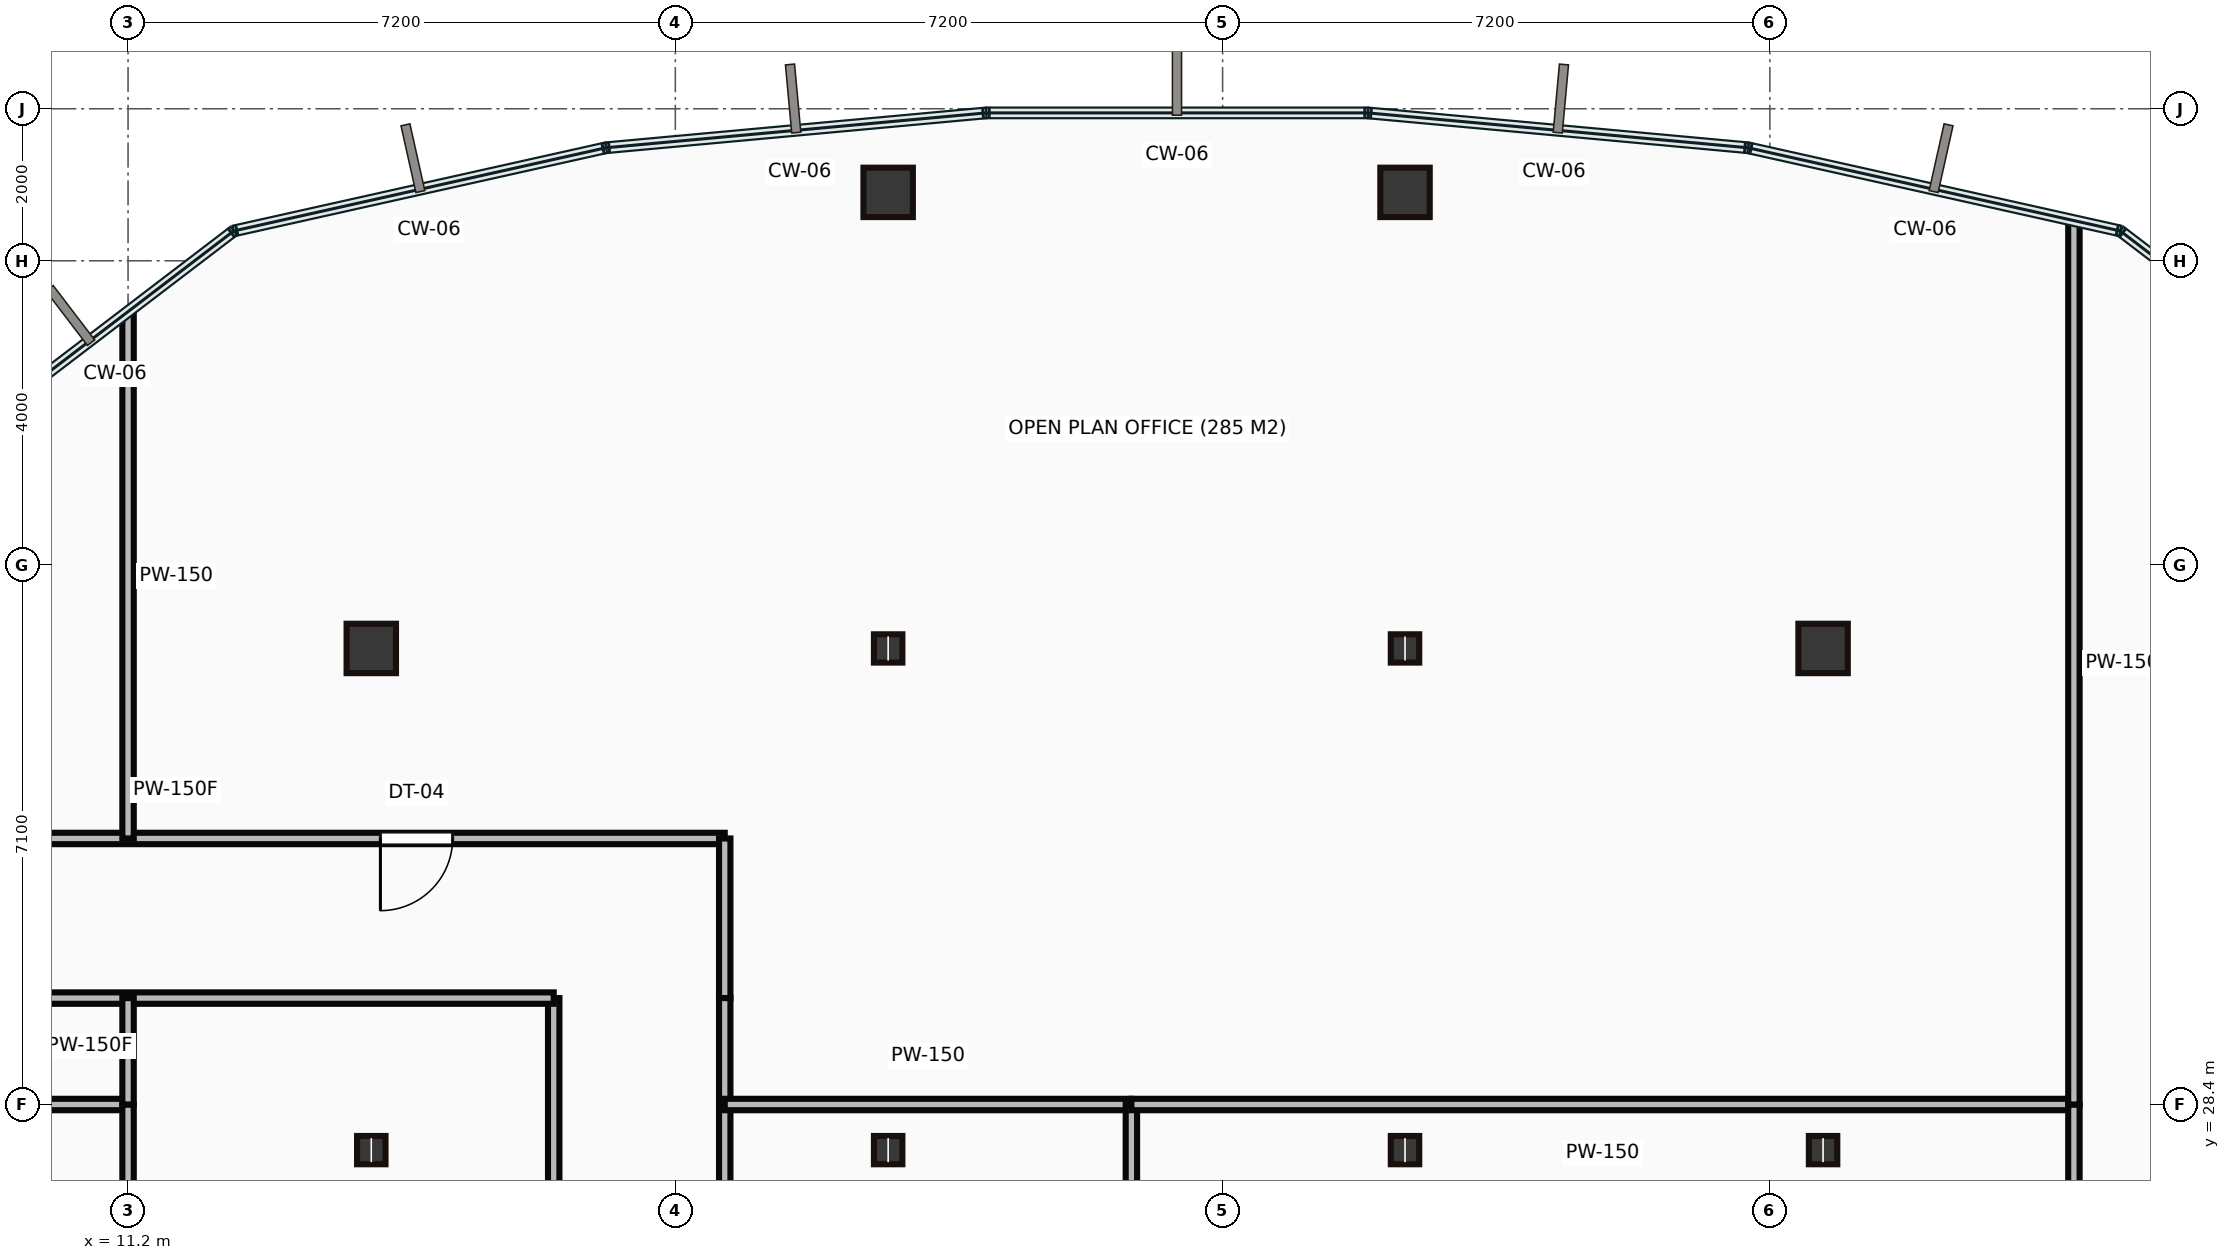
"""IFC4 building model, lengths in metres.
Left out: names, types, materials, properties, quantities, classifications, styles, units other than length and angle.
Written with IfcOpenShell. Run it as: python <this file> out.ifc"""

import sys

from ifc_helpers import new_model, si_unit, direction, frame, frame_2d, origin, origin_2d, place, context, subcontext, project, spatial, rectangle, hollow_rectangle, i_section, extrude, source, transform, mapped, element, fill, save


model = new_model("IFC4")
c1 = context("Model", 3, precision=1e-05, world=origin(), true_north=direction((0.0, 1.0)))
c2 = subcontext(c1, "Body", "Model", "MODEL_VIEW")
j1 = project(units=[si_unit("LENGTHUNIT", "METRE"), si_unit("PLANEANGLEUNIT", "RADIAN")], contexts=[c1])
p1 = place(None, origin())
s1 = spatial("IfcSite", under=j1, at=p1, CompositionType="ELEMENT")
p2 = place(p1, origin())
s2 = spatial("IfcBuilding", under=s1, at=p2, CompositionType="ELEMENT")
p3 = place(p2, frame((0.0, 0.0, 184.4)))
s3 = spatial("IfcBuildingStorey", under=s2, at=p3, CompositionType="ELEMENT", Elevation=184.4)
m1 = source(origin(), c2, "Body", "SweptSolid", [
    extrude(i_section(OverallWidth=0.374, OverallDepth=0.372, WebThickness=0.016, FlangeThickness=0.026, at=origin_2d()), origin(), (0.0, 0.0, 1.0), 4.2),
])
p4 = place(p3, frame((14.4, 27.8, 0.0), z_axis=(0.0, 0.0, 1.0), x_axis=(1.0, 0.0, 0.0)))
e1 = element("IfcColumn", 1, at=p4, inside=s3, PredefinedType="COLUMN", context=c2, shape_type="MappedRepresentation", body=[
    mapped(m1, transform((0.0, 0.0, 0.0))),
])
m2 = source(origin(), c2, "Body", "SweptSolid", [
    extrude(hollow_rectangle(XDim=0.65, YDim=0.65, WallThickness=0.032, at=origin_2d()), origin(), (0.0, 0.0, 1.0), 4.2),
])
p5 = place(p3, frame((14.4, 34.4, 0.0), z_axis=(0.0, 0.0, 1.0), x_axis=(1.0, 0.0, 0.0)))
e2 = element("IfcColumn", 2, at=p5, inside=s3, PredefinedType="COLUMN", context=c2, shape_type="MappedRepresentation", body=[
    mapped(m2, transform((0.0, 0.0, 0.0))),
])
for number, where, z_axis, x_axis in (
    (3, (21.2, 27.8, 0.0), (0.0, 0.0, 1.0), (1.0, 0.0, 0.0)),
    (4, (21.2, 34.4, 0.0), (0.0, 0.0, 1.0), (1.0, 0.0, 0.0)),
):
    element("IfcColumn", number, at=place(p3, frame(where, z_axis=z_axis, x_axis=x_axis)), inside=s3, PredefinedType="COLUMN", context=c2, shape_type="MappedRepresentation", body=[
        mapped(m1, transform((0.0, 0.0, 0.0))),
    ])
p6 = place(p3, frame((21.2, 40.4, 0.0), z_axis=(0.0, 0.0, 1.0), x_axis=(1.0, 0.0, 0.0)))
e5 = element("IfcColumn", 5, at=p6, inside=s3, PredefinedType="COLUMN", context=c2, shape_type="MappedRepresentation", body=[
    mapped(m2, transform((0.0, 0.0, 0.0))),
])
for number, where, z_axis, x_axis in (
    (6, (28.0, 27.8, 0.0), (0.0, 0.0, 1.0), (1.0, 0.0, 0.0)),
    (7, (28.0, 34.4, 0.0), (0.0, 0.0, 1.0), (1.0, 0.0, 0.0)),
):
    element("IfcColumn", number, at=place(p3, frame(where, z_axis=z_axis, x_axis=x_axis)), inside=s3, PredefinedType="COLUMN", context=c2, shape_type="MappedRepresentation", body=[
        mapped(m1, transform((0.0, 0.0, 0.0))),
    ])
p7 = place(p3, frame((28.0, 40.4, 0.0), z_axis=(0.0, 0.0, 1.0), x_axis=(1.0, 0.0, 0.0)))
e8 = element("IfcColumn", 8, at=p7, inside=s3, PredefinedType="COLUMN", context=c2, shape_type="MappedRepresentation", body=[
    mapped(m2, transform((0.0, 0.0, 0.0))),
])
p8 = place(p3, frame((33.5, 27.8, 0.0), z_axis=(0.0, 0.0, 1.0), x_axis=(1.0, 0.0, 0.0)))
e9 = element("IfcColumn", 9, at=p8, inside=s3, PredefinedType="COLUMN", context=c2, shape_type="MappedRepresentation", body=[
    mapped(m1, transform((0.0, 0.0, 0.0))),
])
p9 = place(p3, frame((33.5, 34.4, 0.0), z_axis=(0.0, 0.0, 1.0), x_axis=(1.0, 0.0, 0.0)))
e10 = element("IfcColumn", 10, at=p9, inside=s3, PredefinedType="COLUMN", context=c2, shape_type="MappedRepresentation", body=[
    mapped(m2, transform((0.0, 0.0, 0.0))),
])
m3 = source(origin(), c2, "Body", "SweptSolid", [
    extrude(rectangle(XDim=13.5, YDim=0.15, at=frame_2d((6.75, 0.0))), origin(), (0.0, 0.0, 1.0), 3.95),
])
p10 = place(p3, frame((16.8, 16.3, 0.0), z_axis=(0.0, 0.0, 1.0), x_axis=(0.0, 1.0, 0.0)))
e11 = element("IfcWall", 11, at=p10, inside=s3, PredefinedType="PARTITIONING", context=c2, shape_type="MappedRepresentation", body=[
    mapped(m3, transform((0.0, 0.0, 0.0))),
])
p11 = place(p10, frame((6.275, 0.0, 0.0)))
e12 = element("IfcOpeningElement", 12, at=p11, cuts=e11, PredefinedType="OPENING", context=c2, shape_type="SweptSolid", body=[
    extrude(rectangle(XDim=0.95, YDim=2.15, at=frame_2d((0.475, 1.075))), frame((0.0, 0.085, 0.0), z_axis=(0.0, -1.0, 0.0), x_axis=(1.0, 0.0, 0.0)), (0.0, 0.0, 1.0), 0.17),
])
m4 = source(origin(), c2, "Body", "SweptSolid", [
    extrude(rectangle(XDim=12.2, YDim=0.15, at=frame_2d((6.1, 0.0))), origin(), (0.0, 0.0, 1.0), 3.95),
])
p12 = place(p3, frame((16.8, 29.8, 0.0), z_axis=(0.0, 0.0, 1.0), x_axis=(-1.0, 0.0, 0.0)))
e13 = element("IfcWall", 13, at=p12, inside=s3, PredefinedType="PARTITIONING", context=c2, shape_type="MappedRepresentation", body=[
    mapped(m4, transform((0.0, 0.0, 0.0))),
])
m5 = source(origin(), c2, "Body", "SweptSolid", [
    extrude(rectangle(XDim=14.45, YDim=0.15, at=frame_2d((7.225, 0.0))), origin(), (0.0, 0.0, 1.0), 3.95),
])
p13 = place(p3, frame((4.6, 31.9, 0.0), z_axis=(0.0, 0.0, 1.0), x_axis=(1.0, 0.0, 0.0)))
e14 = element("IfcWall", 14, at=p13, inside=s3, PredefinedType="PARTITIONING", context=c2, shape_type="MappedRepresentation", body=[
    mapped(m5, transform((0.0, 0.0, 0.0))),
])
p14 = place(p13, frame((2.955, 0.0, 0.0)))
e15 = element("IfcOpeningElement", 15, at=p14, cuts=e14, PredefinedType="OPENING", context=c2, shape_type="SweptSolid", body=[
    extrude(rectangle(XDim=0.95, YDim=2.15, at=frame_2d((0.475, 1.075))), frame((0.0, 0.085, 0.0), z_axis=(0.0, -1.0, 0.0), x_axis=(1.0, 0.0, 0.0)), (0.0, 0.0, 1.0), 0.17),
])
p15 = place(p13, frame((9.92, 0.0, 0.0)))
e16 = element("IfcOpeningElement", 16, at=p15, cuts=e14, PredefinedType="OPENING", context=c2, shape_type="SweptSolid", body=[
    extrude(rectangle(XDim=0.95, YDim=2.15, at=frame_2d((0.475, 1.075))), frame((0.0, 0.085, 0.0), z_axis=(0.0, -1.0, 0.0), x_axis=(1.0, 0.0, 0.0)), (0.0, 0.0, 1.0), 0.17),
])
m6 = source(origin(), c2, "Body", "SweptSolid", [
    extrude(rectangle(XDim=2.1, YDim=0.15, at=frame_2d((1.05, 0.0))), origin(), (0.0, 0.0, 1.0), 3.95),
])
p16 = place(p3, frame((19.05, 31.9, 0.0), z_axis=(0.0, 0.0, 1.0), x_axis=(0.0, -1.0, 0.0)))
e17 = element("IfcWall", 17, at=p16, inside=s3, PredefinedType="PARTITIONING", context=c2, shape_type="MappedRepresentation", body=[
    mapped(m6, transform((0.0, 0.0, 0.0))),
])
p17 = place(p3, frame((19.05, 29.8, 0.0), z_axis=(0.0, 0.0, 1.0), x_axis=(0.0, -1.0, 0.0)))
e18 = element("IfcWall", 18, at=p17, inside=s3, PredefinedType="PARTITIONING", context=c2, shape_type="MappedRepresentation", body=[
    mapped(m3, transform((0.0, 0.0, 0.0))),
])
p18 = place(p17, frame((6.845, 0.0, 0.0)))
e19 = element("IfcOpeningElement", 19, at=p18, cuts=e18, PredefinedType="OPENING", context=c2, shape_type="SweptSolid", body=[
    extrude(rectangle(XDim=0.95, YDim=2.15, at=frame_2d((0.475, 1.075))), frame((0.0, 0.085, 0.0), z_axis=(0.0, -1.0, 0.0), x_axis=(1.0, 0.0, 0.0)), (0.0, 0.0, 1.0), 0.17),
])
m7 = source(origin(), c2, "Body", "SweptSolid", [
    extrude(rectangle(XDim=11.18, YDim=0.15, at=frame_2d((5.59, 0.0))), origin(), (0.0, 0.0, 1.0), 3.95),
])
p19 = place(p3, frame((0.02, 28.4, 0.0), z_axis=(0.0, 0.0, 1.0), x_axis=(1.0, 0.0, 0.0)))
e20 = element("IfcWall", 20, at=p19, inside=s3, PredefinedType="PARTITIONING", context=c2, shape_type="MappedRepresentation", body=[
    mapped(m7, transform((0.0, 0.0, 0.0))),
])
m8 = source(origin(), c2, "Body", "SweptSolid", [
    extrude(rectangle(XDim=12.1, YDim=0.15, at=frame_2d((6.05, 0.0))), origin(), (0.0, 0.0, 1.0), 3.95),
])
p20 = place(p3, frame((11.2, 28.4, 0.0), z_axis=(0.0, 0.0, 1.0), x_axis=(0.0, -1.0, 0.0)))
e21 = element("IfcWall", 21, at=p20, inside=s3, PredefinedType="PARTITIONING", context=c2, shape_type="MappedRepresentation", body=[
    mapped(m8, transform((0.0, 0.0, 0.0))),
])
m9 = source(origin(), c2, "Body", "SweptSolid", [
    extrude(rectangle(XDim=1.4, YDim=0.15, at=frame_2d((0.7, 0.0))), origin(), (0.0, 0.0, 1.0), 3.95),
])
p21 = place(p3, frame((11.2, 29.8, 0.0), z_axis=(0.0, 0.0, 1.0), x_axis=(0.0, -1.0, 0.0)))
e22 = element("IfcWall", 22, at=p21, inside=s3, PredefinedType="PARTITIONING", context=c2, shape_type="MappedRepresentation", body=[
    mapped(m9, transform((0.0, 0.0, 0.0))),
])
m10 = source(origin(), c2, "Body", "SweptSolid", [
    extrude(rectangle(XDim=6.906, YDim=0.15, at=frame_2d((3.453, 0.0))), origin(), (0.0, 0.0, 1.0), 3.95),
])
p22 = place(p3, frame((11.2, 38.806, 0.0), z_axis=(0.0, 0.0, 1.0), x_axis=(0.0, -1.0, 0.0)))
e23 = element("IfcWall", 23, at=p22, inside=s3, PredefinedType="PARTITIONING", context=c2, shape_type="MappedRepresentation", body=[
    mapped(m10, transform((0.0, 0.0, 0.0))),
])
m11 = source(origin(), c2, "Body", "SweptSolid", [
    extrude(rectangle(XDim=5.35, YDim=0.15, at=frame_2d((2.675, 0.0))), origin(), (0.0, 0.0, 1.0), 3.95),
])
p23 = place(p3, frame((19.05, 28.4, 0.0), z_axis=(0.0, 0.0, 1.0), x_axis=(1.0, 0.0, 0.0)))
e24 = element("IfcWall", 24, at=p23, inside=s3, PredefinedType="PARTITIONING", context=c2, shape_type="MappedRepresentation", body=[
    mapped(m11, transform((0.0, 0.0, 0.0))),
])
p24 = place(p3, frame((24.4, 28.4, 0.0), z_axis=(0.0, 0.0, 1.0), x_axis=(0.0, -1.0, 0.0)))
e25 = element("IfcWall", 25, at=p24, inside=s3, PredefinedType="PARTITIONING", context=c2, shape_type="MappedRepresentation", body=[
    mapped(m8, transform((0.0, 0.0, 0.0))),
])
m12 = source(origin(), c2, "Body", "SweptSolid", [
    extrude(rectangle(XDim=12.4, YDim=0.15, at=frame_2d((6.2, 0.0))), origin(), (0.0, 0.0, 1.0), 3.95),
])
p25 = place(p3, frame((36.8, 28.4, 0.0), z_axis=(0.0, 0.0, 1.0), x_axis=(-1.0, 0.0, 0.0)))
e26 = element("IfcWall", 26, at=p25, inside=s3, PredefinedType="PARTITIONING", context=c2, shape_type="MappedRepresentation", body=[
    mapped(m12, transform((0.0, 0.0, 0.0))),
])
p26 = place(p3, frame((36.8, 28.4, 0.0), z_axis=(0.0, 0.0, 1.0), x_axis=(0.0, -1.0, 0.0)))
e27 = element("IfcWall", 27, at=p26, inside=s3, PredefinedType="PARTITIONING", context=c2, shape_type="MappedRepresentation", body=[
    mapped(m8, transform((0.0, 0.0, 0.0))),
])
m13 = source(origin(), c2, "Body", "SweptSolid", [
    extrude(rectangle(XDim=11.608, YDim=0.15, at=frame_2d((5.804, 0.0))), origin(), (0.0, 0.0, 1.0), 3.95),
])
p27 = place(p3, frame((36.8, 40.008, 0.0), z_axis=(0.0, 0.0, 1.0), x_axis=(0.0, -1.0, 0.0)))
e28 = element("IfcWall", 28, at=p27, inside=s3, PredefinedType="PARTITIONING", context=c2, shape_type="MappedRepresentation", body=[
    mapped(m13, transform((0.0, 0.0, 0.0))),
])
m14 = source(origin(), c2, "Body", "SweptSolid", [
    extrude(rectangle(XDim=0.95, YDim=2.15, at=frame_2d((0.475, 1.075))), frame((0.0, 0.025, 0.0), z_axis=(0.0, -1.0, 0.0), x_axis=(1.0, 0.0, 0.0)), (0.0, 0.0, 1.0), 0.05),
])
p28 = place(p15, origin())
e29 = element("IfcDoor", 29, at=p28, inside=s3, OperationType="SINGLE_SWING_LEFT", PredefinedType="DOOR", context=c2, shape_type="MappedRepresentation", body=[
    mapped(m14, transform((0.0, 0.0, 0.0))),
])
fill(e16, e29)
save(model, sys.argv[1])
